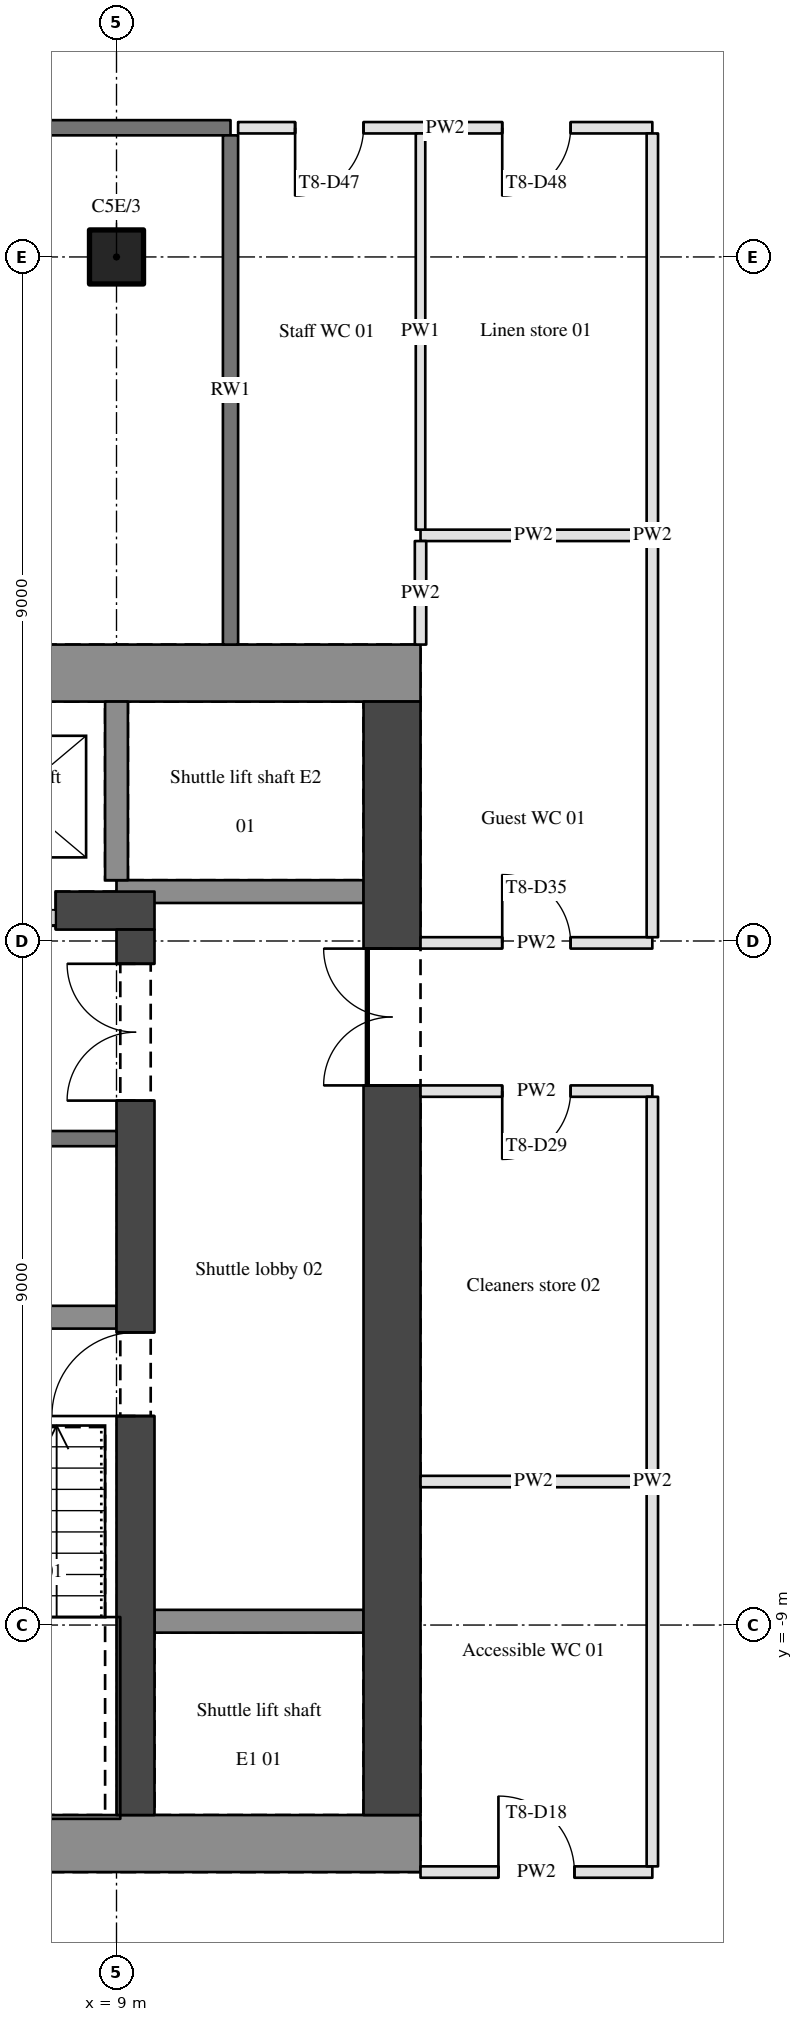
"""IFC4 building model, lengths in metres.
Left out: names, types, materials, properties, quantities, classifications, styles, units other than length and angle.
Written with IfcOpenShell. Run it as: python <this file> out.ifc"""

import sys

from ifc_helpers import new_model, si_unit, direction, frame, frame_2d, origin, origin_2d, place, context, subcontext, project, spatial, rectangle, hollow_circle, extrude, element, fill, save


model = new_model("IFC4")
c1 = context("Model", 3, precision=1e-05, world=origin(), true_north=direction((0.0, 1.0)))
c2 = subcontext(c1, "Body", "Model", "MODEL_VIEW")
j1 = project(units=[si_unit("LENGTHUNIT", "METRE"), si_unit("PLANEANGLEUNIT", "RADIAN")], contexts=[c1])
p1 = place(None, origin())
s1 = spatial("IfcSite", under=j1, at=p1, CompositionType="ELEMENT")
p2 = place(p1, origin())
s2 = spatial("IfcBuilding", under=s1, at=p2, CompositionType="ELEMENT")
p3 = place(p2, frame((0.0, 0.0, 121.5)))
s3 = spatial("IfcBuildingStorey", under=s2, at=p3, CompositionType="ELEMENT", Elevation=121.5)
p4 = place(p3, frame((9.0, 9.0, 0.0), z_axis=(0.0, 0.0, 1.0), x_axis=(1.0, 0.0, 0.0)))
e1 = element("IfcColumn", 1, at=p4, inside=s3, PredefinedType="COLUMN", context=c2, shape_type="SweptSolid", body=[
    extrude(hollow_circle(Radius=0.355, WallThickness=0.032, at=origin_2d()), origin(), (0.0, 0.0, 1.0), 3.4),
])
for number, where, z_axis, x_axis in (
    (2, (-13.0, -11.875, 0.0), (0.0, 0.0, 1.0), (1.0, 0.0, 0.0)),
    (3, (-13.0, 3.525, 0.0), (0.0, 0.0, 1.0), (1.0, 0.0, 0.0)),
):
    element("IfcWall", number, at=place(p3, frame(where, z_axis=z_axis, x_axis=x_axis)), inside=s3, PredefinedType="SHEAR", context=c2, shape_type="SweptSolid", body=[
        extrude(rectangle(XDim=26.0, YDim=0.75, at=frame_2d((13.0, 0.0))), origin(), (0.0, 0.0, 1.0), 3.4),
    ])
p5 = place(p3, frame((12.625, -11.5, 0.0), z_axis=(0.0, 0.0, 1.0), x_axis=(0.0, 1.0, 0.0)))
e4 = element("IfcWall", 4, at=p5, inside=s3, PredefinedType="SHEAR", context=c2, shape_type="SweptSolid", body=[
    extrude(rectangle(XDim=14.65, YDim=0.75, at=frame_2d((7.325, 0.0))), origin(), (0.0, 0.0, 1.0), 3.4),
])
p6 = place(p5, frame((9.6, 0.0, 0.0)))
e5 = element("IfcOpeningElement", 5, at=p6, cuts=e4, PredefinedType="OPENING", context=c2, shape_type="SweptSolid", body=[
    extrude(rectangle(XDim=1.8, YDim=2.1, at=frame_2d((0.9, 1.05))), frame((0.0, 0.385, 0.0), z_axis=(0.0, -1.0, 0.0), x_axis=(1.0, 0.0, 0.0)), (0.0, 0.0, 1.0), 0.77),
])
p7 = place(p3, frame((-9.5, 0.4, 0.0), z_axis=(0.0, 0.0, 1.0), x_axis=(1.0, 0.0, 0.0)))
e6 = element("IfcWall", 6, at=p7, inside=s3, PredefinedType="SHEAR", context=c2, shape_type="SweptSolid", body=[
    extrude(rectangle(XDim=19.0, YDim=0.5, at=frame_2d((9.5, 0.0))), origin(), (0.0, 0.0, 1.0), 3.4),
])
p8 = place(p7, frame((1.3, 0.0, 0.0)))
e7 = element("IfcOpeningElement", 7, at=p8, cuts=e6, PredefinedType="OPENING", context=c2, shape_type="SweptSolid", body=[
    extrude(rectangle(XDim=1.1, YDim=2.1, at=frame_2d((0.55, 1.05))), frame((0.0, 0.26, 0.0), z_axis=(0.0, -1.0, 0.0), x_axis=(1.0, 0.0, 0.0)), (0.0, 0.0, 1.0), 0.52),
])
p9 = place(p7, frame((4.0, 0.0, 0.0)))
e8 = element("IfcOpeningElement", 8, at=p9, cuts=e6, PredefinedType="OPENING", context=c2, shape_type="SweptSolid", body=[
    extrude(rectangle(XDim=1.1, YDim=2.1, at=frame_2d((0.55, 1.05))), frame((0.0, 0.26, 0.0), z_axis=(0.0, -1.0, 0.0), x_axis=(1.0, 0.0, 0.0)), (0.0, 0.0, 1.0), 0.52),
])
p10 = place(p7, frame((6.7, 0.0, 0.0)))
e9 = element("IfcOpeningElement", 9, at=p10, cuts=e6, PredefinedType="OPENING", context=c2, shape_type="SweptSolid", body=[
    extrude(rectangle(XDim=1.1, YDim=2.1, at=frame_2d((0.55, 1.05))), frame((0.0, 0.26, 0.0), z_axis=(0.0, -1.0, 0.0), x_axis=(1.0, 0.0, 0.0)), (0.0, 0.0, 1.0), 0.52),
])
p11 = place(p7, frame((11.2, 0.0, 0.0)))
e10 = element("IfcOpeningElement", 10, at=p11, cuts=e6, PredefinedType="OPENING", context=c2, shape_type="SweptSolid", body=[
    extrude(rectangle(XDim=1.1, YDim=2.1, at=frame_2d((0.55, 1.05))), frame((0.0, 0.26, 0.0), z_axis=(0.0, -1.0, 0.0), x_axis=(1.0, 0.0, 0.0)), (0.0, 0.0, 1.0), 0.52),
])
p12 = place(p7, frame((13.9, 0.0, 0.0)))
e11 = element("IfcOpeningElement", 11, at=p12, cuts=e6, PredefinedType="OPENING", context=c2, shape_type="SweptSolid", body=[
    extrude(rectangle(XDim=1.1, YDim=2.1, at=frame_2d((0.55, 1.05))), frame((0.0, 0.26, 0.0), z_axis=(0.0, -1.0, 0.0), x_axis=(1.0, 0.0, 0.0)), (0.0, 0.0, 1.0), 0.52),
])
p13 = place(p7, frame((16.6, 0.0, 0.0)))
e12 = element("IfcOpeningElement", 12, at=p13, cuts=e6, PredefinedType="OPENING", context=c2, shape_type="SweptSolid", body=[
    extrude(rectangle(XDim=1.1, YDim=2.1, at=frame_2d((0.55, 1.05))), frame((0.0, 0.26, 0.0), z_axis=(0.0, -1.0, 0.0), x_axis=(1.0, 0.0, 0.0)), (0.0, 0.0, 1.0), 0.52),
])
p14 = place(p3, frame((9.25, -11.5, 0.0), z_axis=(0.0, 0.0, 1.0), x_axis=(0.0, 1.0, 0.0)))
e13 = element("IfcWall", 13, at=p14, inside=s3, PredefinedType="SHEAR", context=c2, shape_type="SweptSolid", body=[
    extrude(rectangle(XDim=11.65, YDim=0.5, at=frame_2d((5.825, 0.0))), origin(), (0.0, 0.0, 1.0), 3.4),
])
p15 = place(p14, frame((9.4, 0.0, 0.0)))
e14 = element("IfcOpeningElement", 14, at=p15, cuts=e13, PredefinedType="OPENING", context=c2, shape_type="SweptSolid", body=[
    extrude(rectangle(XDim=1.8, YDim=2.1, at=frame_2d((0.9, 1.05))), frame((0.0, 0.26, 0.0), z_axis=(0.0, -1.0, 0.0), x_axis=(1.0, 0.0, 0.0)), (0.0, 0.0, 1.0), 0.52),
])
p16 = place(p14, frame((5.25, 0.0, 0.0)))
e15 = element("IfcOpeningElement", 15, at=p16, cuts=e13, PredefinedType="OPENING", context=c2, shape_type="SweptSolid", body=[
    extrude(rectangle(XDim=1.1, YDim=2.1, at=frame_2d((0.55, 1.05))), frame((0.0, 0.26, 0.0), z_axis=(0.0, -1.0, 0.0), x_axis=(1.0, 0.0, 0.0)), (0.0, 0.0, 1.0), 0.52),
])
p17 = place(p3, frame((13.0, -12.25, 0.0), z_axis=(0.0, 0.0, 1.0), x_axis=(1.0, 0.0, 0.0)))
e16 = element("IfcWall", 16, at=p17, inside=s3, PredefinedType="PARTITIONING", context=c2, shape_type="SweptSolid", body=[
    extrude(rectangle(XDim=3.05, YDim=0.15, at=frame_2d((1.525, 0.0))), origin(), (0.0, 0.0, 1.0), 2.46),
])
p18 = place(p17, frame((1.025, 0.0, 0.0)))
e17 = element("IfcOpeningElement", 17, at=p18, cuts=e16, PredefinedType="OPENING", context=c2, shape_type="SweptSolid", body=[
    extrude(rectangle(XDim=1.0, YDim=2.1, at=frame_2d((0.5, 1.05))), frame((0.0, 0.085, 0.0), z_axis=(0.0, -1.0, 0.0), x_axis=(1.0, 0.0, 0.0)), (0.0, 0.0, 1.0), 0.17),
])
p19 = place(p3, frame((9.5, -8.95, 0.0), z_axis=(0.0, 0.0, 1.0), x_axis=(1.0, 0.0, 0.0)))
e18 = element("IfcWall", 18, at=p19, inside=s3, PredefinedType="SHEAR", context=c2, shape_type="SweptSolid", body=[
    extrude(rectangle(XDim=2.75, YDim=0.3, at=frame_2d((1.375, 0.0))), origin(), (0.0, 0.0, 1.0), 3.4),
])
p20 = place(p3, frame((13.0, -7.112, 0.0), z_axis=(0.0, 0.0, 1.0), x_axis=(1.0, 0.0, 0.0)))
e19 = element("IfcWall", 19, at=p20, inside=s3, PredefinedType="PARTITIONING", context=c2, shape_type="SweptSolid", body=[
    extrude(rectangle(XDim=2.975, YDim=0.15, at=frame_2d((1.488, 0.0))), origin(), (0.0, 0.0, 1.0), 2.46),
])
p21 = place(p3, frame((6.0, -4.95, 0.0), z_axis=(0.0, 0.0, 1.0), x_axis=(1.0, 0.0, 0.0)))
e20 = element("IfcWall", 20, at=p21, inside=s3, PredefinedType="SHEAR", context=c2, shape_type="SweptSolid", body=[
    extrude(rectangle(XDim=3.0, YDim=0.3, at=frame_2d((1.5, 0.0))), origin(), (0.0, 0.0, 1.0), 3.4),
])
p22 = place(p3, frame((9.0, -2.6, 0.0), z_axis=(0.0, 0.0, 1.0), x_axis=(-1.0, 0.0, 0.0)))
e21 = element("IfcWall", 21, at=p22, inside=s3, PredefinedType="SOLIDWALL", context=c2, shape_type="SweptSolid", body=[
    extrude(rectangle(XDim=18.0, YDim=0.2, at=frame_2d((9.0, 0.0))), origin(), (0.0, 0.0, 1.0), 3.1),
])
p23 = place(p22, frame((8.5, 0.0, 0.0)))
e22 = element("IfcOpeningElement", 22, at=p23, cuts=e21, PredefinedType="OPENING", context=c2, shape_type="SweptSolid", body=[
    extrude(rectangle(XDim=1.0, YDim=2.1, at=frame_2d((0.5, 1.05))), frame((0.0, 0.11, 0.0), z_axis=(0.0, -1.0, 0.0), x_axis=(1.0, 0.0, 0.0)), (0.0, 0.0, 1.0), 0.22),
])
p24 = place(p22, frame((13.5, 0.0, 0.0)))
e23 = element("IfcOpeningElement", 23, at=p24, cuts=e21, PredefinedType="OPENING", context=c2, shape_type="SweptSolid", body=[
    extrude(rectangle(XDim=0.9, YDim=2.1, at=frame_2d((0.45, 1.05))), frame((0.0, 0.11, 0.0), z_axis=(0.0, -1.0, 0.0), x_axis=(1.0, 0.0, 0.0)), (0.0, 0.0, 1.0), 0.22),
])
p25 = place(p22, frame((3.6, 0.0, 0.0)))
e24 = element("IfcOpeningElement", 24, at=p25, cuts=e21, PredefinedType="OPENING", context=c2, shape_type="SweptSolid", body=[
    extrude(rectangle(XDim=0.9, YDim=2.1, at=frame_2d((0.45, 1.05))), frame((0.0, 0.11, 0.0), z_axis=(0.0, -1.0, 0.0), x_axis=(1.0, 0.0, 0.0)), (0.0, 0.0, 1.0), 0.22),
])
p26 = place(p3, frame((16.05, -1.975, 0.0), z_axis=(0.0, 0.0, 1.0), x_axis=(-1.0, 0.0, 0.0)))
e25 = element("IfcWall", 25, at=p26, inside=s3, PredefinedType="PARTITIONING", context=c2, shape_type="SweptSolid", body=[
    extrude(rectangle(XDim=3.05, YDim=0.15, at=frame_2d((1.525, 0.0))), origin(), (0.0, 0.0, 1.0), 2.46),
])
p27 = place(p26, frame((1.075, 0.0, 0.0)))
e26 = element("IfcOpeningElement", 26, at=p27, cuts=e25, PredefinedType="OPENING", context=c2, shape_type="SweptSolid", body=[
    extrude(rectangle(XDim=0.9, YDim=2.1, at=frame_2d((0.45, 1.05))), frame((0.0, 0.085, 0.0), z_axis=(0.0, -1.0, 0.0), x_axis=(1.0, 0.0, 0.0)), (0.0, 0.0, 1.0), 0.17),
])
p28 = place(p3, frame((13.0, -0.025, 0.0), z_axis=(0.0, 0.0, 1.0), x_axis=(1.0, 0.0, 0.0)))
e27 = element("IfcWall", 27, at=p28, inside=s3, PredefinedType="PARTITIONING", context=c2, shape_type="SweptSolid", body=[
    extrude(rectangle(XDim=3.05, YDim=0.15, at=frame_2d((1.525, 0.0))), origin(), (0.0, 0.0, 1.0), 2.46),
])
p29 = place(p28, frame((1.075, 0.0, 0.0)))
e28 = element("IfcOpeningElement", 28, at=p29, cuts=e27, PredefinedType="OPENING", context=c2, shape_type="SweptSolid", body=[
    extrude(rectangle(XDim=0.9, YDim=2.1, at=frame_2d((0.45, 1.05))), frame((0.0, 0.085, 0.0), z_axis=(0.0, -1.0, 0.0), x_axis=(1.0, 0.0, 0.0)), (0.0, 0.0, 1.0), 0.17),
])
p30 = place(p3, frame((12.25, 0.65, 0.0), z_axis=(0.0, 0.0, 1.0), x_axis=(-1.0, 0.0, 0.0)))
e29 = element("IfcWall", 29, at=p30, inside=s3, PredefinedType="SHEAR", context=c2, shape_type="SweptSolid", body=[
    extrude(rectangle(XDim=3.25, YDim=0.3, at=frame_2d((1.625, 0.0))), origin(), (0.0, 0.0, 1.0), 3.4),
])
p31 = place(p3, frame((13.0, 5.337, 0.0), z_axis=(0.0, 0.0, 1.0), x_axis=(1.0, 0.0, 0.0)))
e30 = element("IfcWall", 30, at=p31, inside=s3, PredefinedType="PARTITIONING", context=c2, shape_type="SweptSolid", body=[
    extrude(rectangle(XDim=2.975, YDim=0.15, at=frame_2d((1.488, 0.0))), origin(), (0.0, 0.0, 1.0), 2.46),
])
p32 = place(p3, frame((10.5, 10.7, 0.0), z_axis=(0.0, 0.0, 1.0), x_axis=(-1.0, 0.0, 0.0)))
e31 = element("IfcWall", 31, at=p32, inside=s3, PredefinedType="SOLIDWALL", context=c2, shape_type="SweptSolid", body=[
    extrude(rectangle(XDim=10.5, YDim=0.2, at=frame_2d((5.25, 0.0))), origin(), (0.0, 0.0, 1.0), 2.46),
])
p33 = place(p32, frame((4.8, 0.0, 0.0)))
e32 = element("IfcOpeningElement", 32, at=p33, cuts=e31, PredefinedType="OPENING", context=c2, shape_type="SweptSolid", body=[
    extrude(rectangle(XDim=0.9, YDim=2.1, at=frame_2d((0.45, 1.05))), frame((0.0, 0.11, 0.0), z_axis=(0.0, -1.0, 0.0), x_axis=(1.0, 0.0, 0.0)), (0.0, 0.0, 1.0), 0.22),
])
p34 = place(p3, frame((16.05, 10.7, 0.0), z_axis=(0.0, 0.0, 1.0), x_axis=(-1.0, 0.0, 0.0)))
e33 = element("IfcWall", 33, at=p34, inside=s3, PredefinedType="PARTITIONING", context=c2, shape_type="SweptSolid", body=[
    extrude(rectangle(XDim=5.45, YDim=0.15, at=frame_2d((2.725, 0.0))), origin(), (0.0, 0.0, 1.0), 2.46),
])
p35 = place(p34, frame((3.8, 0.0, 0.0)))
e34 = element("IfcOpeningElement", 34, at=p35, cuts=e33, PredefinedType="OPENING", context=c2, shape_type="SweptSolid", body=[
    extrude(rectangle(XDim=0.9, YDim=2.1, at=frame_2d((0.45, 1.05))), frame((0.0, 0.085, 0.0), z_axis=(0.0, -1.0, 0.0), x_axis=(1.0, 0.0, 0.0)), (0.0, 0.0, 1.0), 0.17),
])
p36 = place(p34, frame((1.075, 0.0, 0.0)))
e35 = element("IfcOpeningElement", 35, at=p36, cuts=e33, PredefinedType="OPENING", context=c2, shape_type="SweptSolid", body=[
    extrude(rectangle(XDim=0.9, YDim=2.1, at=frame_2d((0.45, 1.05))), frame((0.0, 0.085, 0.0), z_axis=(0.0, -1.0, 0.0), x_axis=(1.0, 0.0, 0.0)), (0.0, 0.0, 1.0), 0.17),
])
p37 = place(p3, frame((9.0, 0.8, 0.0), z_axis=(0.0, 0.0, 1.0), x_axis=(0.0, 1.0, 0.0)))
e36 = element("IfcWall", 36, at=p37, inside=s3, PredefinedType="SHEAR", context=c2, shape_type="SweptSolid", body=[
    extrude(rectangle(XDim=2.35, YDim=0.3, at=frame_2d((1.175, 0.0))), origin(), (0.0, 0.0, 1.0), 3.4),
])
p38 = place(p3, frame((10.5, 3.9, 0.0), z_axis=(0.0, 0.0, 1.0), x_axis=(0.0, 1.0, 0.0)))
e37 = element("IfcWall", 37, at=p38, inside=s3, PredefinedType="SOLIDWALL", context=c2, shape_type="SweptSolid", body=[
    extrude(rectangle(XDim=6.7, YDim=0.2, at=frame_2d((3.35, 0.0))), origin(), (0.0, 0.0, 1.0), 2.46),
])
p39 = place(p3, frame((13.0, 3.9, 0.0), z_axis=(0.0, 0.0, 1.0), x_axis=(0.0, 1.0, 0.0)))
e38 = element("IfcWall", 38, at=p39, inside=s3, PredefinedType="PARTITIONING", context=c2, shape_type="SweptSolid", body=[
    extrude(rectangle(XDim=1.362, YDim=0.15, at=frame_2d((0.681, 0.0))), origin(), (0.0, 0.0, 1.0), 2.46),
])
p40 = place(p3, frame((13.0, 5.412, 0.0), z_axis=(0.0, 0.0, 1.0), x_axis=(0.0, 1.0, 0.0)))
e39 = element("IfcWall", 39, at=p40, inside=s3, PredefinedType="PARTITIONING", context=c2, shape_type="SweptSolid", body=[
    extrude(rectangle(XDim=5.213, YDim=0.125, at=frame_2d((2.606, 0.0))), origin(), (0.0, 0.0, 1.0), 2.46),
])
p41 = place(p3, frame((16.05, -12.175, 0.0), z_axis=(0.0, 0.0, 1.0), x_axis=(0.0, 1.0, 0.0)))
e40 = element("IfcWall", 40, at=p41, inside=s3, PredefinedType="PARTITIONING", context=c2, shape_type="SweptSolid", body=[
    extrude(rectangle(XDim=10.125, YDim=0.15, at=frame_2d((5.062, 0.0))), origin(), (0.0, 0.0, 1.0), 2.46),
])
p42 = place(p3, frame((16.05, 0.05, 0.0), z_axis=(0.0, 0.0, 1.0), x_axis=(0.0, 1.0, 0.0)))
e41 = element("IfcWall", 41, at=p42, inside=s3, PredefinedType="PARTITIONING", context=c2, shape_type="SweptSolid", body=[
    extrude(rectangle(XDim=10.575, YDim=0.15, at=frame_2d((5.288, 0.0))), origin(), (0.0, 0.0, 1.0), 2.46),
])
p43 = place(p6, origin())
e42 = element("IfcDoor", 42, at=p43, inside=s3, OperationType="DOUBLE_DOOR_SINGLE_SWING", PredefinedType="DOOR", context=c2, shape_type="SweptSolid", body=[
    extrude(rectangle(XDim=1.8, YDim=2.1, at=frame_2d((0.9, 1.05))), frame((0.0, 0.025, 0.0), z_axis=(0.0, -1.0, 0.0), x_axis=(1.0, 0.0, 0.0)), (0.0, 0.0, 1.0), 0.05),
])
fill(e5, e42)
p44 = place(p15, origin())
e43 = element("IfcDoor", 43, at=p44, inside=s3, OperationType="DOUBLE_DOOR_SINGLE_SWING", PredefinedType="DOOR", context=c2, shape_type="SweptSolid", body=[
    extrude(rectangle(XDim=1.8, YDim=2.1, at=frame_2d((0.9, 1.05))), frame((0.0, 0.025, 0.0), z_axis=(0.0, -1.0, 0.0), x_axis=(1.0, 0.0, 0.0)), (0.0, 0.0, 1.0), 0.05),
])
fill(e14, e43)
p45 = place(p16, origin())
e44 = element("IfcDoor", 44, at=p45, inside=s3, OperationType="SINGLE_SWING_LEFT", PredefinedType="DOOR", context=c2, shape_type="SweptSolid", body=[
    extrude(rectangle(XDim=1.1, YDim=2.1, at=frame_2d((0.55, 1.05))), frame((0.0, 0.025, 0.0), z_axis=(0.0, -1.0, 0.0), x_axis=(1.0, 0.0, 0.0)), (0.0, 0.0, 1.0), 0.05),
])
fill(e15, e44)
p46 = place(p35, origin())
e45 = element("IfcDoor", 45, at=p46, inside=s3, OperationType="SINGLE_SWING_RIGHT", PredefinedType="DOOR", context=c2, shape_type="SweptSolid", body=[
    extrude(rectangle(XDim=0.9, YDim=2.1, at=frame_2d((0.45, 1.05))), frame((0.0, 0.025, 0.0), z_axis=(0.0, -1.0, 0.0), x_axis=(1.0, 0.0, 0.0)), (0.0, 0.0, 1.0), 0.05),
])
fill(e34, e45)
p47 = place(p29, origin())
e46 = element("IfcDoor", 46, at=p47, inside=s3, OperationType="SINGLE_SWING_LEFT", PredefinedType="DOOR", context=c2, shape_type="SweptSolid", body=[
    extrude(rectangle(XDim=0.9, YDim=2.1, at=frame_2d((0.45, 1.05))), frame((0.0, 0.025, 0.0), z_axis=(0.0, -1.0, 0.0), x_axis=(1.0, 0.0, 0.0)), (0.0, 0.0, 1.0), 0.05),
])
fill(e28, e46)
p48 = place(p36, origin())
e47 = element("IfcDoor", 47, at=p48, inside=s3, OperationType="SINGLE_SWING_RIGHT", PredefinedType="DOOR", context=c2, shape_type="SweptSolid", body=[
    extrude(rectangle(XDim=0.9, YDim=2.1, at=frame_2d((0.45, 1.05))), frame((0.0, 0.025, 0.0), z_axis=(0.0, -1.0, 0.0), x_axis=(1.0, 0.0, 0.0)), (0.0, 0.0, 1.0), 0.05),
])
fill(e35, e47)
p49 = place(p18, origin())
e48 = element("IfcDoor", 48, at=p49, inside=s3, OperationType="SINGLE_SWING_LEFT", PredefinedType="DOOR", context=c2, shape_type="SweptSolid", body=[
    extrude(rectangle(XDim=1.0, YDim=2.1, at=frame_2d((0.5, 1.05))), frame((0.0, 0.025, 0.0), z_axis=(0.0, -1.0, 0.0), x_axis=(1.0, 0.0, 0.0)), (0.0, 0.0, 1.0), 0.05),
])
fill(e17, e48)
p50 = place(p27, origin())
e49 = element("IfcDoor", 49, at=p50, inside=s3, OperationType="SINGLE_SWING_RIGHT", PredefinedType="DOOR", context=c2, shape_type="SweptSolid", body=[
    extrude(rectangle(XDim=0.9, YDim=2.1, at=frame_2d((0.45, 1.05))), frame((0.0, 0.025, 0.0), z_axis=(0.0, -1.0, 0.0), x_axis=(1.0, 0.0, 0.0)), (0.0, 0.0, 1.0), 0.05),
])
fill(e26, e49)
p51 = place(p13, origin())
e50 = element("IfcDoor", 50, at=p51, inside=s3, OperationType="DOUBLE_DOOR_SLIDING", PredefinedType="DOOR", context=c2, shape_type="SweptSolid", body=[
    extrude(rectangle(XDim=1.1, YDim=2.1, at=frame_2d((0.55, 1.05))), frame((0.0, 0.025, 0.0), z_axis=(0.0, -1.0, 0.0), x_axis=(1.0, 0.0, 0.0)), (0.0, 0.0, 1.0), 0.05),
])
fill(e12, e50)
save(model, sys.argv[1])
